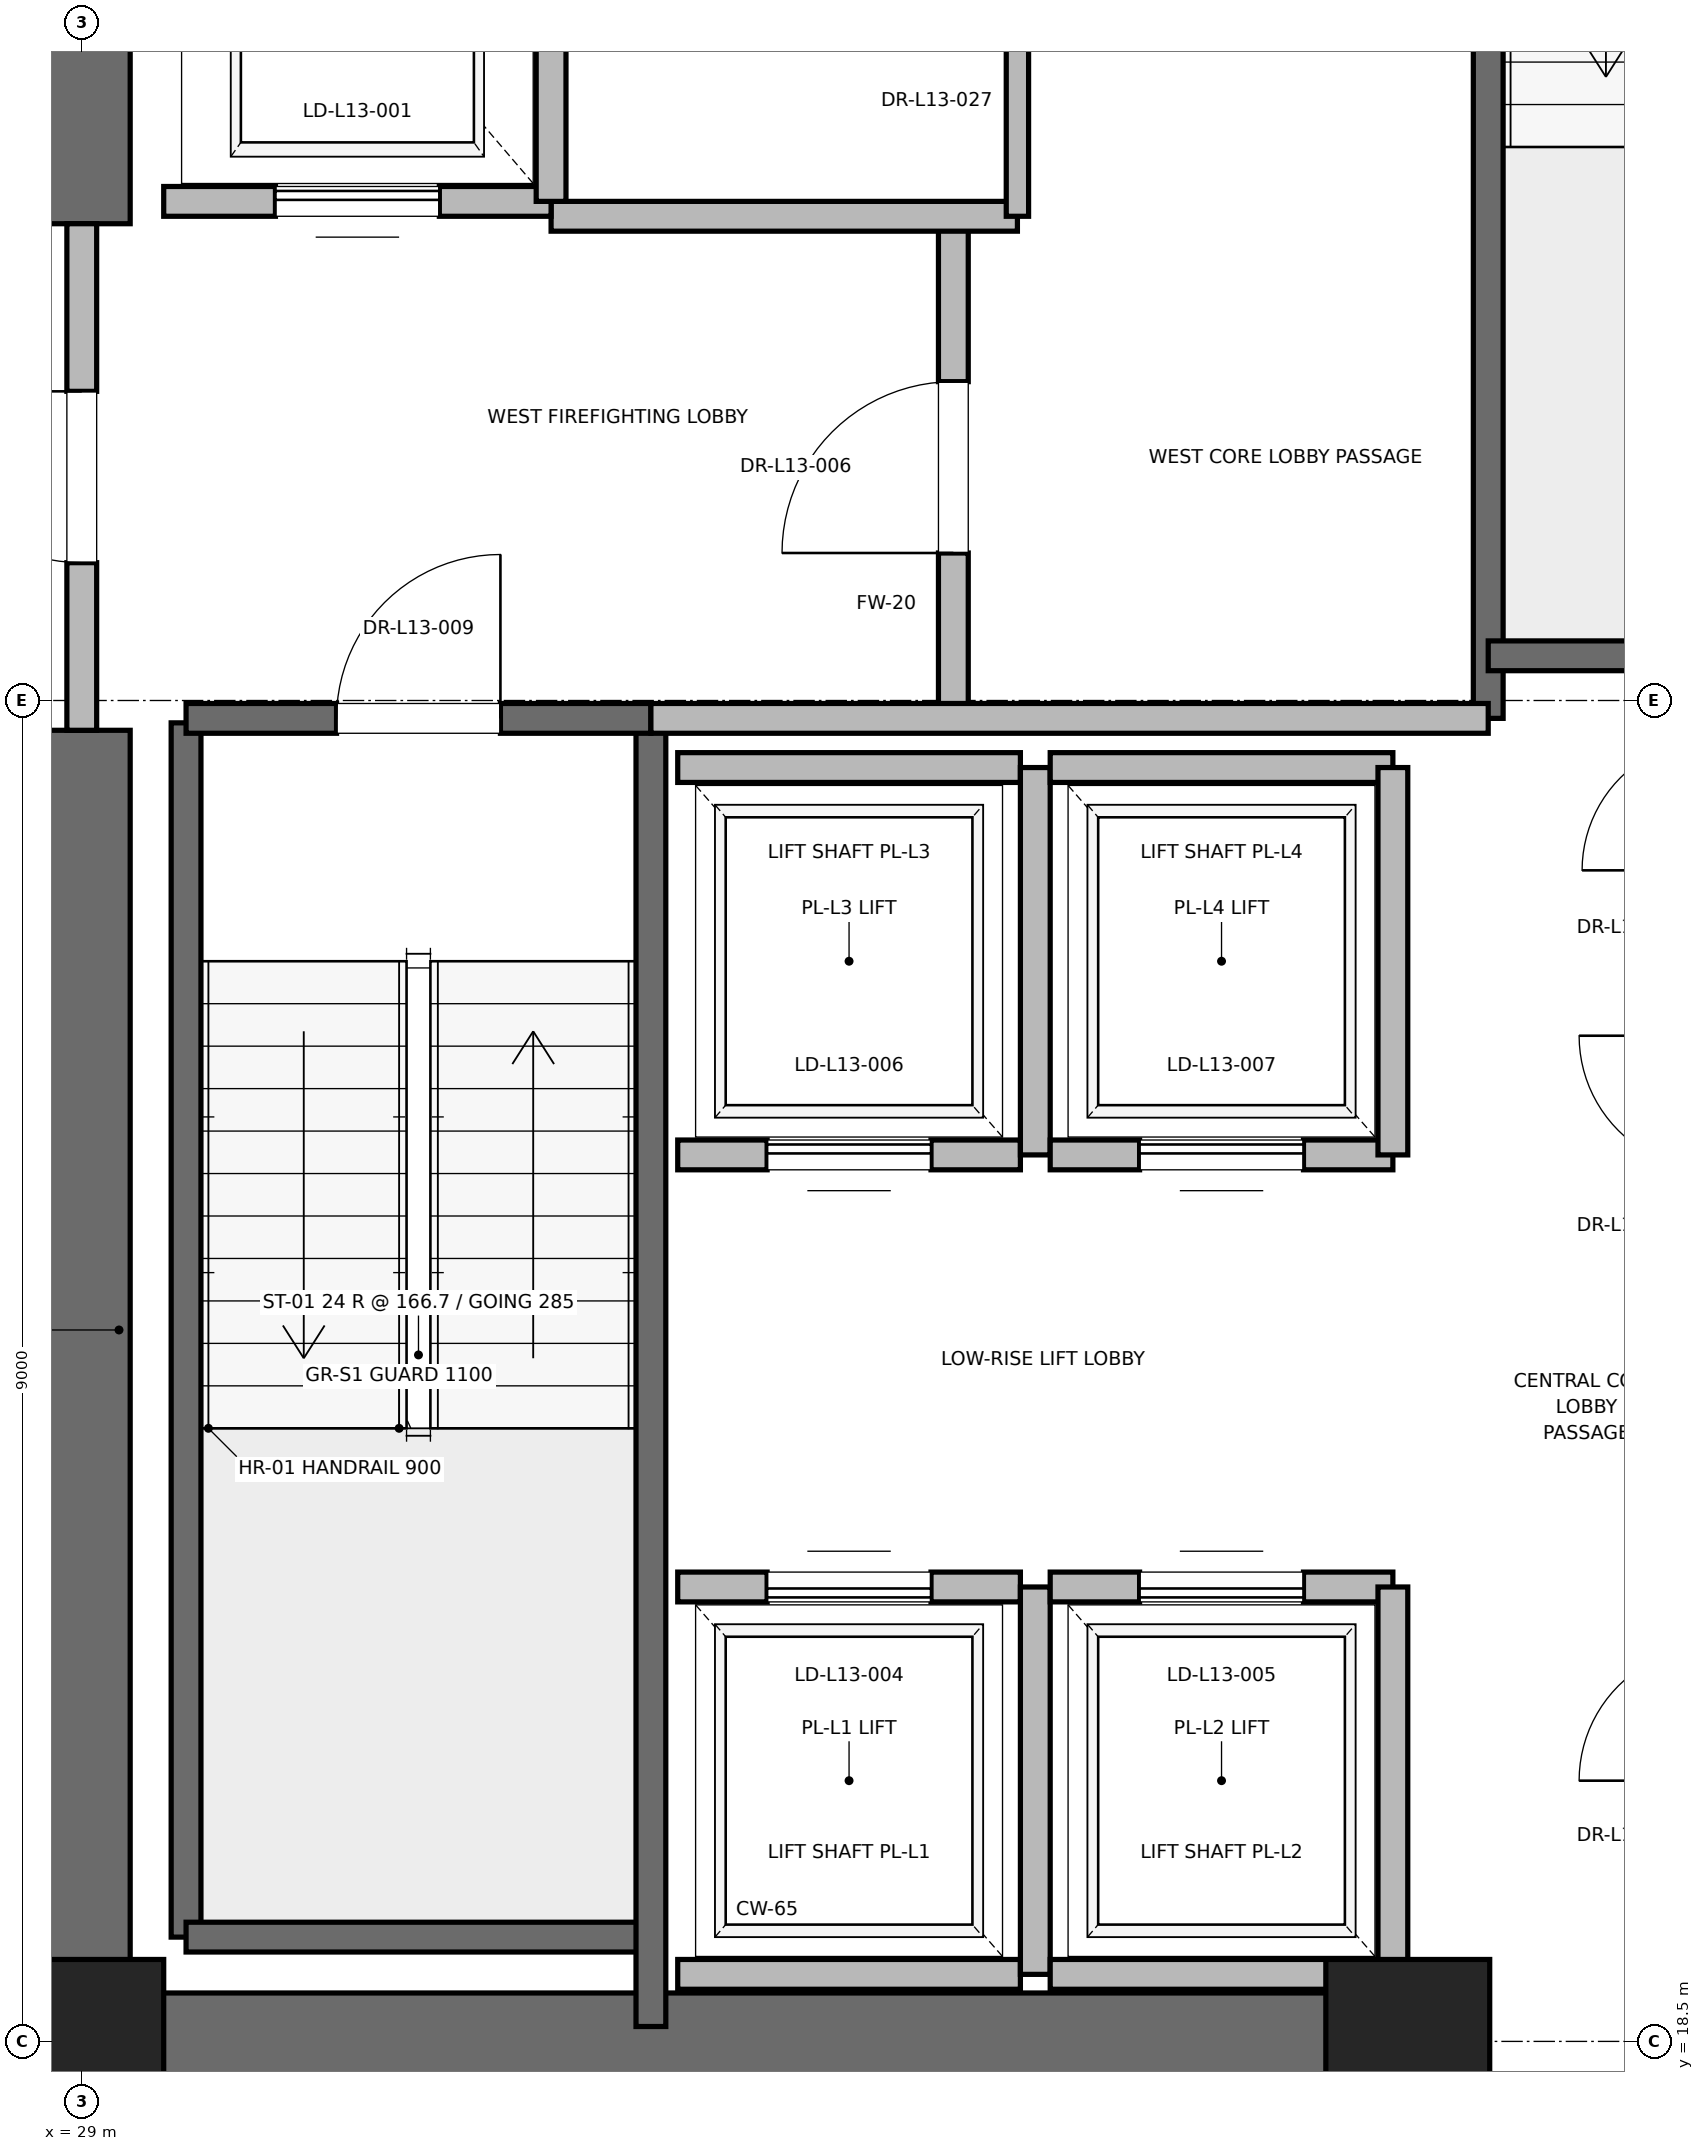
"""IFC4 building model, lengths in metres.
Left out: names, types, materials, properties, quantities, classifications, styles, units other than length and angle.
Written with IfcOpenShell. Run it as: python <this file> out.ifc"""

import sys

from ifc_helpers import new_model, si_unit, direction, frame, frame_2d, origin, origin_2d, place, context, subcontext, project, spatial, rectangle, extrude, element, fill, save


model = new_model("IFC4")
c1 = context("Model", 3, precision=1e-05, world=origin(), true_north=direction((0.0, 1.0)))
c2 = subcontext(c1, "Body", "Model", "MODEL_VIEW")
j1 = project(units=[si_unit("LENGTHUNIT", "METRE"), si_unit("PLANEANGLEUNIT", "RADIAN")], contexts=[c1])
p1 = place(None, origin())
s1 = spatial("IfcSite", under=j1, at=p1, CompositionType="ELEMENT")
p2 = place(p1, origin())
s2 = spatial("IfcBuilding", under=s1, at=p2, CompositionType="ELEMENT")
p3 = place(p2, frame((0.0, 0.0, 59.6)))
s3 = spatial("IfcBuildingStorey", under=s2, at=p3, CompositionType="ELEMENT", Elevation=59.6)
for number, where, z_axis, x_axis in (
    (1, (29.0, 18.5, 0.0), (0.0, 0.0, 1.0), (1.0, 0.0, 0.0)),
    (2, (37.9, 18.5, 0.0), (0.0, 0.0, 1.0), (1.0, 0.0, 0.0)),
):
    element("IfcColumn", number, at=place(p3, frame(where, z_axis=z_axis, x_axis=x_axis)), inside=s3, PredefinedType="PILASTER", context=c2, shape_type="SweptSolid", body=[
        extrude(rectangle(XDim=1.1, YDim=1.1, at=origin_2d()), origin(), (0.0, 0.0, 1.0), 4.0),
    ])
p4 = place(p3, frame((29.0, 18.5, 0.0), z_axis=(0.0, 0.0, 1.0), x_axis=(1.0, 0.0, 0.0)))
e3 = element("IfcWall", 3, at=p4, inside=s3, PredefinedType="SHEAR", context=c2, shape_type="SweptSolid", body=[
    extrude(rectangle(XDim=9.2, YDim=0.65, at=frame_2d((4.6, 0.0))), origin(), (0.0, 0.0, 1.0), 3.76),
])
p5 = place(p3, frame((29.0, 18.5, 0.0), z_axis=(0.0, 0.0, 1.0), x_axis=(0.0, 1.0, 0.0)))
e4 = element("IfcWall", 4, at=p5, inside=s3, PredefinedType="SHEAR", context=c2, shape_type="SweptSolid", body=[
    extrude(rectangle(XDim=8.8, YDim=0.65, at=frame_2d((4.4, 0.0))), origin(), (0.0, 0.0, 1.0), 3.76),
])
p6 = place(p3, frame((29.0, 30.7, 0.0), z_axis=(0.0, 0.0, 1.0), x_axis=(0.0, 1.0, 0.0)))
e5 = element("IfcWall", 5, at=p6, inside=s3, PredefinedType="SHEAR", context=c2, shape_type="SweptSolid", body=[
    extrude(rectangle(XDim=5.8, YDim=0.65, at=frame_2d((2.9, 0.0))), origin(), (0.0, 0.0, 1.0), 3.76),
])
p7 = place(p3, frame((29.7, 19.2, 0.0), z_axis=(0.0, 0.0, 1.0), x_axis=(0.0, 1.0, 0.0)))
e6 = element("IfcWall", 6, at=p7, inside=s3, PredefinedType="SOLIDWALL", context=c2, shape_type="SweptSolid", body=[
    extrude(rectangle(XDim=8.15, YDim=0.2, at=frame_2d((4.075, 0.0))), origin(), (0.0, 0.0, 1.0), 3.76),
])
p8 = place(p3, frame((29.7, 19.2, 0.0), z_axis=(0.0, 0.0, 1.0), x_axis=(1.0, 0.0, 0.0)))
e7 = element("IfcWall", 7, at=p8, inside=s3, PredefinedType="SOLIDWALL", context=c2, shape_type="SweptSolid", body=[
    extrude(rectangle(XDim=3.12, YDim=0.2, at=frame_2d((1.56, 0.0))), origin(), (0.0, 0.0, 1.0), 3.76),
])
p9 = place(p3, frame((32.82, 18.6, 0.0), z_axis=(0.0, 0.0, 1.0), x_axis=(0.0, 1.0, 0.0)))
e8 = element("IfcWall", 8, at=p9, inside=s3, PredefinedType="SOLIDWALL", context=c2, shape_type="SweptSolid", body=[
    extrude(rectangle(XDim=8.78, YDim=0.2, at=frame_2d((4.39, 0.0))), origin(), (0.0, 0.0, 1.0), 3.76),
])
p10 = place(p3, frame((29.7, 27.38, 0.0), z_axis=(0.0, 0.0, 1.0), x_axis=(1.0, 0.0, 0.0)))
e9 = element("IfcWall", 9, at=p10, inside=s3, PredefinedType="SOLIDWALL", context=c2, shape_type="SweptSolid", body=[
    extrude(rectangle(XDim=3.12, YDim=0.2, at=frame_2d((1.56, 0.0))), origin(), (0.0, 0.0, 1.0), 3.76),
])
p11 = place(p10, frame((1.01, 0.0, 0.0)))
e10 = element("IfcOpeningElement", 10, at=p11, cuts=e9, PredefinedType="OPENING", context=c2, shape_type="SweptSolid", body=[
    extrude(rectangle(XDim=1.1, YDim=2.15, at=frame_2d((0.55, 1.075))), frame((0.0, 0.1, 0.0), z_axis=(0.0, -1.0, 0.0), x_axis=(1.0, 0.0, 0.0)), (0.0, 0.0, 1.0), 0.2),
])
p12 = place(p3, frame((38.44, 27.38, 0.0), z_axis=(0.0, 0.0, 1.0), x_axis=(0.0, 1.0, 0.0)))
e11 = element("IfcWall", 11, at=p12, inside=s3, PredefinedType="SOLIDWALL", context=c2, shape_type="SweptSolid", body=[
    extrude(rectangle(XDim=8.87, YDim=0.2, at=frame_2d((4.435, 0.0))), origin(), (0.0, 0.0, 1.0), 3.76),
])
p13 = place(p3, frame((38.44, 27.8, 0.0), z_axis=(0.0, 0.0, 1.0), x_axis=(1.0, 0.0, 0.0)))
e12 = element("IfcWall", 12, at=p13, inside=s3, PredefinedType="SOLIDWALL", context=c2, shape_type="SweptSolid", body=[
    extrude(rectangle(XDim=3.32, YDim=0.2, at=frame_2d((1.66, 0.0))), origin(), (0.0, 0.0, 1.0), 3.76),
])
p14 = place(p3, frame((34.85, 27.38, 0.0), z_axis=(0.0, 0.0, 1.0), x_axis=(0.0, 1.0, 0.0)))
e13 = element("IfcWall", 13, at=p14, inside=s3, PredefinedType="PARTITIONING", context=c2, shape_type="SweptSolid", body=[
    extrude(rectangle(XDim=3.37, YDim=0.2, at=frame_2d((1.685, 0.0))), origin(), (0.0, 0.0, 1.0), 3.76),
])
p15 = place(p14, frame((1.11, 0.0, 0.0)))
e14 = element("IfcOpeningElement", 14, at=p15, cuts=e13, PredefinedType="OPENING", context=c2, shape_type="SweptSolid", body=[
    extrude(rectangle(XDim=1.15, YDim=2.2, at=frame_2d((0.575, 1.1))), frame((0.0, 0.1, 0.0), z_axis=(0.0, -1.0, 0.0), x_axis=(1.0, 0.0, 0.0)), (0.0, 0.0, 1.0), 0.2),
])
p16 = place(p3, frame((29.0, 27.3, 0.0), z_axis=(0.0, 0.0, 1.0), x_axis=(0.0, 1.0, 0.0)))
e15 = element("IfcWall", 15, at=p16, inside=s3, PredefinedType="PARTITIONING", context=c2, shape_type="SweptSolid", body=[
    extrude(rectangle(XDim=3.4, YDim=0.2, at=frame_2d((1.7, 0.0))), origin(), (0.0, 0.0, 1.0), 2.54),
])
p17 = place(p16, frame((1.125, 0.0, 0.0)))
e16 = element("IfcOpeningElement", 16, at=p17, cuts=e15, PredefinedType="OPENING", context=c2, shape_type="SweptSolid", body=[
    extrude(rectangle(XDim=1.15, YDim=2.2, at=frame_2d((0.575, 1.1))), frame((0.0, 0.1, 0.0), z_axis=(0.0, -1.0, 0.0), x_axis=(1.0, 0.0, 0.0)), (0.0, 0.0, 1.0), 0.2),
])
p18 = place(p3, frame((32.82, 27.38, 0.0), z_axis=(0.0, 0.0, 1.0), x_axis=(1.0, 0.0, 0.0)))
e17 = element("IfcWall", 17, at=p18, inside=s3, PredefinedType="PARTITIONING", context=c2, shape_type="SweptSolid", body=[
    extrude(rectangle(XDim=5.62, YDim=0.2, at=frame_2d((2.81, 0.0))), origin(), (0.0, 0.0, 1.0), 3.76),
])
p19 = place(p3, frame((32.15, 30.75, 0.0), z_axis=(0.0, 0.0, 1.0), x_axis=(1.0, 0.0, 0.0)))
e18 = element("IfcWall", 18, at=p19, inside=s3, PredefinedType="PARTITIONING", context=c2, shape_type="SweptSolid", body=[
    extrude(rectangle(XDim=3.13, YDim=0.2, at=frame_2d((1.565, 0.0))), origin(), (0.0, 0.0, 1.0), 3.76),
])
p20 = place(p3, frame((29.55, 30.85, 0.0), z_axis=(0.0, 0.0, 1.0), x_axis=(1.0, 0.0, 0.0)))
e19 = element("IfcWall", 19, at=p20, inside=s3, PredefinedType="SOLIDWALL", context=c2, shape_type="SweptSolid", body=[
    extrude(rectangle(XDim=2.6, YDim=0.2, at=frame_2d((1.3, 0.0))), origin(), (0.0, 0.0, 1.0), 2.54),
])
p21 = place(p20, frame((0.75, 0.0, 0.0)))
e20 = element("IfcOpeningElement", 20, at=p21, cuts=e19, PredefinedType="OPENING", context=c2, shape_type="SweptSolid", body=[
    extrude(rectangle(XDim=1.1, YDim=2.2, at=frame_2d((0.55, 1.1))), frame((0.0, 0.1, 0.0), z_axis=(0.0, -1.0, 0.0), x_axis=(1.0, 0.0, 0.0)), (0.0, 0.0, 1.0), 0.2),
])
p22 = place(p3, frame((32.15, 30.85, 0.0), z_axis=(0.0, 0.0, 1.0), x_axis=(0.0, 1.0, 0.0)))
e21 = element("IfcWall", 21, at=p22, inside=s3, PredefinedType="SOLIDWALL", context=c2, shape_type="SweptSolid", body=[
    extrude(rectangle(XDim=3.0, YDim=0.2, at=frame_2d((1.5, 0.0))), origin(), (0.0, 0.0, 1.0), 3.76),
])
p23 = place(p3, frame((33.0, 18.95, 0.0), z_axis=(0.0, 0.0, 1.0), x_axis=(1.0, 0.0, 0.0)))
e22 = element("IfcWall", 22, at=p23, inside=s3, PredefinedType="SOLIDWALL", context=c2, shape_type="SweptSolid", body=[
    extrude(rectangle(XDim=2.3, YDim=0.2, at=frame_2d((1.15, 0.0))), origin(), (0.0, 0.0, 1.0), 3.76),
])
p24 = place(p3, frame((35.3, 21.55, 0.0), z_axis=(0.0, 0.0, 1.0), x_axis=(-1.0, 0.0, 0.0)))
e23 = element("IfcWall", 23, at=p24, inside=s3, PredefinedType="SOLIDWALL", context=c2, shape_type="SweptSolid", body=[
    extrude(rectangle(XDim=2.3, YDim=0.2, at=frame_2d((1.15, 0.0))), origin(), (0.0, 0.0, 1.0), 3.76),
])
p25 = place(p24, frame((0.6, 0.0, 0.0)))
e24 = element("IfcOpeningElement", 24, at=p25, cuts=e23, PredefinedType="OPENING", context=c2, shape_type="SweptSolid", body=[
    extrude(rectangle(XDim=1.1, YDim=2.2, at=frame_2d((0.55, 1.1))), frame((0.0, 0.1, 0.0), z_axis=(0.0, -1.0, 0.0), x_axis=(1.0, 0.0, 0.0)), (0.0, 0.0, 1.0), 0.2),
])
p26 = place(p3, frame((35.4, 18.95, 0.0), z_axis=(0.0, 0.0, 1.0), x_axis=(0.0, 1.0, 0.0)))
e25 = element("IfcWall", 25, at=p26, inside=s3, PredefinedType="SOLIDWALL", context=c2, shape_type="SweptSolid", body=[
    extrude(rectangle(XDim=2.6, YDim=0.2, at=frame_2d((1.3, 0.0))), origin(), (0.0, 0.0, 1.0), 3.76),
])
p27 = place(p3, frame((35.5, 18.95, 0.0), z_axis=(0.0, 0.0, 1.0), x_axis=(1.0, 0.0, 0.0)))
e26 = element("IfcWall", 26, at=p27, inside=s3, PredefinedType="SOLIDWALL", context=c2, shape_type="SweptSolid", body=[
    extrude(rectangle(XDim=2.3, YDim=0.2, at=frame_2d((1.15, 0.0))), origin(), (0.0, 0.0, 1.0), 2.54),
])
p28 = place(p3, frame((37.8, 21.55, 0.0), z_axis=(0.0, 0.0, 1.0), x_axis=(-1.0, 0.0, 0.0)))
e27 = element("IfcWall", 27, at=p28, inside=s3, PredefinedType="SOLIDWALL", context=c2, shape_type="SweptSolid", body=[
    extrude(rectangle(XDim=2.3, YDim=0.2, at=frame_2d((1.15, 0.0))), origin(), (0.0, 0.0, 1.0), 3.76),
])
p29 = place(p28, frame((0.6, 0.0, 0.0)))
e28 = element("IfcOpeningElement", 28, at=p29, cuts=e27, PredefinedType="OPENING", context=c2, shape_type="SweptSolid", body=[
    extrude(rectangle(XDim=1.1, YDim=2.2, at=frame_2d((0.55, 1.1))), frame((0.0, 0.1, 0.0), z_axis=(0.0, -1.0, 0.0), x_axis=(1.0, 0.0, 0.0)), (0.0, 0.0, 1.0), 0.2),
])
p30 = place(p3, frame((37.8, 18.95, 0.0), z_axis=(0.0, 0.0, 1.0), x_axis=(0.0, 1.0, 0.0)))
e29 = element("IfcWall", 29, at=p30, inside=s3, PredefinedType="SOLIDWALL", context=c2, shape_type="SweptSolid", body=[
    extrude(rectangle(XDim=2.6, YDim=0.2, at=frame_2d((1.3, 0.0))), origin(), (0.0, 0.0, 1.0), 2.54),
])
p31 = place(p3, frame((33.0, 24.45, 0.0), z_axis=(0.0, 0.0, 1.0), x_axis=(1.0, 0.0, 0.0)))
e30 = element("IfcWall", 30, at=p31, inside=s3, PredefinedType="SOLIDWALL", context=c2, shape_type="SweptSolid", body=[
    extrude(rectangle(XDim=2.3, YDim=0.2, at=frame_2d((1.15, 0.0))), origin(), (0.0, 0.0, 1.0), 3.76),
])
p32 = place(p31, frame((0.6, 0.0, 0.0)))
e31 = element("IfcOpeningElement", 31, at=p32, cuts=e30, PredefinedType="OPENING", context=c2, shape_type="SweptSolid", body=[
    extrude(rectangle(XDim=1.1, YDim=2.2, at=frame_2d((0.55, 1.1))), frame((0.0, 0.1, 0.0), z_axis=(0.0, -1.0, 0.0), x_axis=(1.0, 0.0, 0.0)), (0.0, 0.0, 1.0), 0.2),
])
p33 = place(p3, frame((35.3, 27.05, 0.0), z_axis=(0.0, 0.0, 1.0), x_axis=(-1.0, 0.0, 0.0)))
e32 = element("IfcWall", 32, at=p33, inside=s3, PredefinedType="SOLIDWALL", context=c2, shape_type="SweptSolid", body=[
    extrude(rectangle(XDim=2.3, YDim=0.2, at=frame_2d((1.15, 0.0))), origin(), (0.0, 0.0, 1.0), 3.76),
])
p34 = place(p3, frame((35.4, 24.45, 0.0), z_axis=(0.0, 0.0, 1.0), x_axis=(0.0, 1.0, 0.0)))
e33 = element("IfcWall", 33, at=p34, inside=s3, PredefinedType="SOLIDWALL", context=c2, shape_type="SweptSolid", body=[
    extrude(rectangle(XDim=2.6, YDim=0.2, at=frame_2d((1.3, 0.0))), origin(), (0.0, 0.0, 1.0), 3.76),
])
p35 = place(p3, frame((35.5, 24.45, 0.0), z_axis=(0.0, 0.0, 1.0), x_axis=(1.0, 0.0, 0.0)))
e34 = element("IfcWall", 34, at=p35, inside=s3, PredefinedType="SOLIDWALL", context=c2, shape_type="SweptSolid", body=[
    extrude(rectangle(XDim=2.3, YDim=0.2, at=frame_2d((1.15, 0.0))), origin(), (0.0, 0.0, 1.0), 3.76),
])
p36 = place(p35, frame((0.6, 0.0, 0.0)))
e35 = element("IfcOpeningElement", 35, at=p36, cuts=e34, PredefinedType="OPENING", context=c2, shape_type="SweptSolid", body=[
    extrude(rectangle(XDim=1.1, YDim=2.2, at=frame_2d((0.55, 1.1))), frame((0.0, 0.1, 0.0), z_axis=(0.0, -1.0, 0.0), x_axis=(1.0, 0.0, 0.0)), (0.0, 0.0, 1.0), 0.2),
])
p37 = place(p3, frame((37.8, 27.05, 0.0), z_axis=(0.0, 0.0, 1.0), x_axis=(-1.0, 0.0, 0.0)))
e36 = element("IfcWall", 36, at=p37, inside=s3, PredefinedType="SOLIDWALL", context=c2, shape_type="SweptSolid", body=[
    extrude(rectangle(XDim=2.3, YDim=0.2, at=frame_2d((1.15, 0.0))), origin(), (0.0, 0.0, 1.0), 3.76),
])
p38 = place(p3, frame((37.8, 24.45, 0.0), z_axis=(0.0, 0.0, 1.0), x_axis=(0.0, 1.0, 0.0)))
e37 = element("IfcWall", 37, at=p38, inside=s3, PredefinedType="SOLIDWALL", context=c2, shape_type="SweptSolid", body=[
    extrude(rectangle(XDim=2.6, YDim=0.2, at=frame_2d((1.3, 0.0))), origin(), (0.0, 0.0, 1.0), 3.76),
])
p39 = place(p3, frame((35.28, 30.75, 0.0), z_axis=(0.0, 0.0, 1.0), x_axis=(0.0, 1.0, 0.0)))
e38 = element("IfcWall", 38, at=p39, inside=s3, PredefinedType="PARTITIONING", context=c2, shape_type="SweptSolid", body=[
    extrude(rectangle(XDim=3.2, YDim=0.15, at=frame_2d((1.6, 0.0))), origin(), (0.0, 0.0, 1.0), 2.85),
])
p40 = place(p39, frame((1.15, 0.0, 0.0)))
e39 = element("IfcOpeningElement", 39, at=p40, cuts=e38, PredefinedType="OPENING", context=c2, shape_type="SweptSolid", body=[
    extrude(rectangle(XDim=0.9, YDim=2.1, at=frame_2d((0.45, 1.05))), frame((0.0, 0.075, 0.0), z_axis=(0.0, -1.0, 0.0), x_axis=(1.0, 0.0, 0.0)), (0.0, 0.0, 1.0), 0.15),
])
p41 = place(p11, origin())
e40 = element("IfcDoor", 40, at=p41, inside=s3, OperationType="SINGLE_SWING_RIGHT", PredefinedType="DOOR", context=c2, shape_type="SweptSolid", body=[
    extrude(rectangle(XDim=1.1, YDim=2.15, at=frame_2d((0.55, 1.075))), frame((0.0, 0.025, 0.0), z_axis=(0.0, -1.0, 0.0), x_axis=(1.0, 0.0, 0.0)), (0.0, 0.0, 1.0), 0.05),
])
fill(e10, e40)
p42 = place(p15, origin())
e41 = element("IfcDoor", 41, at=p42, inside=s3, OperationType="SINGLE_SWING_LEFT", PredefinedType="DOOR", context=c2, shape_type="SweptSolid", body=[
    extrude(rectangle(XDim=1.15, YDim=2.2, at=frame_2d((0.575, 1.1))), frame((0.0, 0.025, 0.0), z_axis=(0.0, -1.0, 0.0), x_axis=(1.0, 0.0, 0.0)), (0.0, 0.0, 1.0), 0.05),
])
fill(e14, e41)
p43 = place(p17, origin())
e42 = element("IfcDoor", 42, at=p43, inside=s3, OperationType="SINGLE_SWING_RIGHT", PredefinedType="DOOR", context=c2, shape_type="SweptSolid", body=[
    extrude(rectangle(XDim=1.15, YDim=2.2, at=frame_2d((0.575, 1.1))), frame((0.0, 0.025, 0.0), z_axis=(0.0, -1.0, 0.0), x_axis=(1.0, 0.0, 0.0)), (0.0, 0.0, 1.0), 0.05),
])
fill(e16, e42)
p44 = place(p21, origin())
e43 = element("IfcDoor", 43, at=p44, inside=s3, OperationType="SLIDING_TO_RIGHT", PredefinedType="DOOR", context=c2, shape_type="SweptSolid", body=[
    extrude(rectangle(XDim=1.1, YDim=2.2, at=frame_2d((0.55, 1.1))), frame((0.0, 0.025, 0.0), z_axis=(0.0, -1.0, 0.0), x_axis=(1.0, 0.0, 0.0)), (0.0, 0.0, 1.0), 0.05),
])
fill(e20, e43)
p45 = place(p25, origin())
e44 = element("IfcDoor", 44, at=p45, inside=s3, OperationType="SLIDING_TO_RIGHT", PredefinedType="DOOR", context=c2, shape_type="SweptSolid", body=[
    extrude(rectangle(XDim=1.1, YDim=2.2, at=frame_2d((0.55, 1.1))), frame((0.0, 0.025, 0.0), z_axis=(0.0, -1.0, 0.0), x_axis=(1.0, 0.0, 0.0)), (0.0, 0.0, 1.0), 0.05),
])
fill(e24, e44)
p46 = place(p29, origin())
e45 = element("IfcDoor", 45, at=p46, inside=s3, OperationType="SLIDING_TO_RIGHT", PredefinedType="DOOR", context=c2, shape_type="SweptSolid", body=[
    extrude(rectangle(XDim=1.1, YDim=2.2, at=frame_2d((0.55, 1.1))), frame((0.0, 0.025, 0.0), z_axis=(0.0, -1.0, 0.0), x_axis=(1.0, 0.0, 0.0)), (0.0, 0.0, 1.0), 0.05),
])
fill(e28, e45)
p47 = place(p32, origin())
e46 = element("IfcDoor", 46, at=p47, inside=s3, OperationType="SLIDING_TO_RIGHT", PredefinedType="DOOR", context=c2, shape_type="SweptSolid", body=[
    extrude(rectangle(XDim=1.1, YDim=2.2, at=frame_2d((0.55, 1.1))), frame((0.0, 0.025, 0.0), z_axis=(0.0, -1.0, 0.0), x_axis=(1.0, 0.0, 0.0)), (0.0, 0.0, 1.0), 0.05),
])
fill(e31, e46)
p48 = place(p36, origin())
e47 = element("IfcDoor", 47, at=p48, inside=s3, OperationType="SLIDING_TO_RIGHT", PredefinedType="DOOR", context=c2, shape_type="SweptSolid", body=[
    extrude(rectangle(XDim=1.1, YDim=2.2, at=frame_2d((0.55, 1.1))), frame((0.0, 0.025, 0.0), z_axis=(0.0, -1.0, 0.0), x_axis=(1.0, 0.0, 0.0)), (0.0, 0.0, 1.0), 0.05),
])
fill(e35, e47)
save(model, sys.argv[1])
